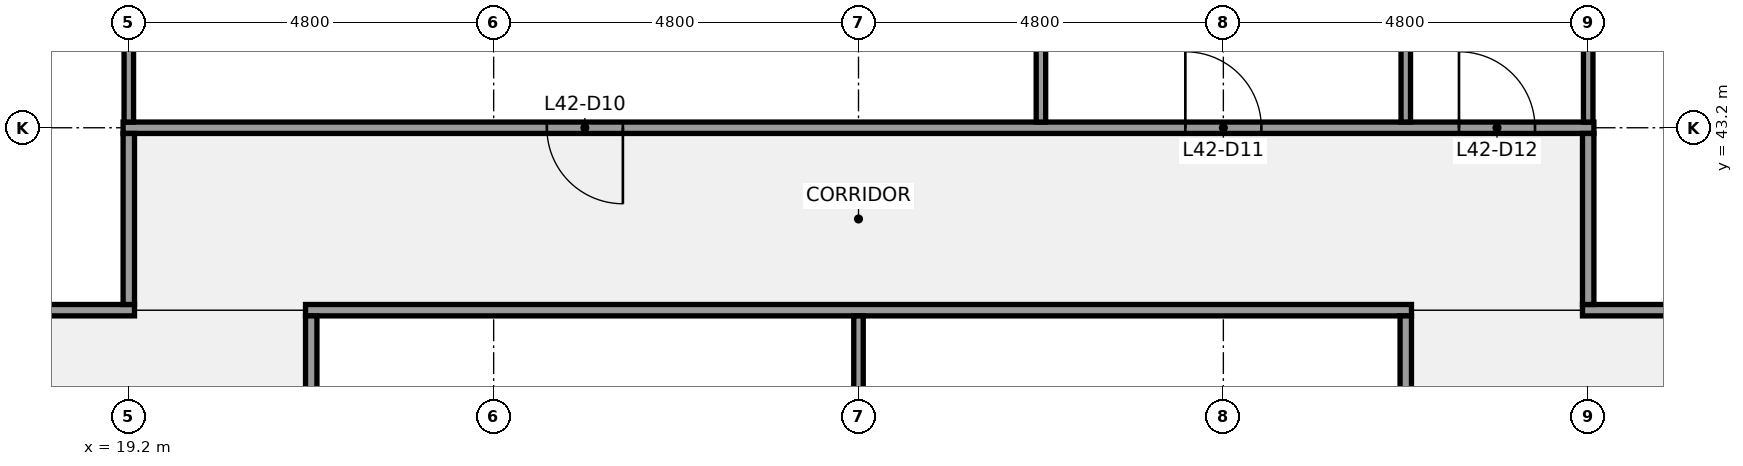
"""IFC4 building model, lengths in metres.
Left out: names, types, materials, properties, quantities, classifications, styles, units other than length and angle.
Written with IfcOpenShell. Run it as: python <this file> out.ifc"""

import sys

from ifc_helpers import new_model, si_unit, direction, frame, frame_2d, origin, place, context, subcontext, project, spatial, rectangle, extrude, element, fill, save


model = new_model("IFC4")
c1 = context("Model", 3, precision=1e-05, world=origin(), true_north=direction((0.0, 1.0)))
c2 = subcontext(c1, "Body", "Model", "MODEL_VIEW")
j1 = project(units=[si_unit("LENGTHUNIT", "METRE"), si_unit("PLANEANGLEUNIT", "RADIAN")], contexts=[c1])
p1 = place(None, origin())
s1 = spatial("IfcSite", under=j1, at=p1, CompositionType="ELEMENT")
p2 = place(p1, origin())
s2 = spatial("IfcBuilding", under=s1, at=p2, CompositionType="ELEMENT")
p3 = place(p2, frame((0.0, 0.0, 197.2)))
s3 = spatial("IfcBuildingStorey", under=s2, at=p3, CompositionType="ELEMENT", Elevation=197.2)
p4 = place(p3, frame((14.325, 40.8, 0.0), z_axis=(0.0, 0.0, 1.0), x_axis=(1.0, 0.0, 0.0)))
e1 = element("IfcWall", 1, at=p4, inside=s3, PredefinedType="PARTITIONING", context=c2, shape_type="SweptSolid", body=[
    extrude(rectangle(XDim=4.95, YDim=0.15, at=frame_2d((2.475, 0.0))), origin(), (0.0, 0.0, 1.0), 2.87),
])
p5 = place(p4, frame((1.975, 0.0, 0.0)))
e2 = element("IfcOpeningElement", 2, at=p5, cuts=e1, PredefinedType="OPENING", context=c2, shape_type="SweptSolid", body=[
    extrude(rectangle(XDim=1.0, YDim=2.1, at=frame_2d((0.5, 1.05))), frame((0.0, 0.085, 0.0), z_axis=(0.0, -1.0, 0.0), x_axis=(1.0, 0.0, 0.0)), (0.0, 0.0, 1.0), 0.17),
])
p6 = place(p3, frame((21.525, 40.8, 0.0), z_axis=(0.0, 0.0, 1.0), x_axis=(1.0, 0.0, 0.0)))
e3 = element("IfcWall", 3, at=p6, inside=s3, PredefinedType="PARTITIONING", context=c2, shape_type="SweptSolid", body=[
    extrude(rectangle(XDim=14.55, YDim=0.15, at=frame_2d((7.275, 0.0))), origin(), (0.0, 0.0, 1.0), 2.87),
])
p7 = place(p3, frame((38.325, 40.8, 0.0), z_axis=(0.0, 0.0, 1.0), x_axis=(1.0, 0.0, 0.0)))
e4 = element("IfcWall", 4, at=p7, inside=s3, PredefinedType="PARTITIONING", context=c2, shape_type="SweptSolid", body=[
    extrude(rectangle(XDim=4.95, YDim=0.15, at=frame_2d((2.475, 0.0))), origin(), (0.0, 0.0, 1.0), 2.87),
])
p8 = place(p7, frame((1.975, 0.0, 0.0)))
e5 = element("IfcOpeningElement", 5, at=p8, cuts=e4, PredefinedType="OPENING", context=c2, shape_type="SweptSolid", body=[
    extrude(rectangle(XDim=1.0, YDim=2.1, at=frame_2d((0.5, 1.05))), frame((0.0, 0.085, 0.0), z_axis=(0.0, -1.0, 0.0), x_axis=(1.0, 0.0, 0.0)), (0.0, 0.0, 1.0), 0.17),
])
p9 = place(p3, frame((19.125, 43.2, 0.0), z_axis=(0.0, 0.0, 1.0), x_axis=(1.0, 0.0, 0.0)))
e6 = element("IfcWall", 6, at=p9, inside=s3, PredefinedType="PARTITIONING", context=c2, shape_type="SweptSolid", body=[
    extrude(rectangle(XDim=19.35, YDim=0.15, at=frame_2d((9.675, 0.0))), origin(), (0.0, 0.0, 1.0), 2.87),
])
p10 = place(p9, frame((5.575, 0.0, 0.0)))
e7 = element("IfcOpeningElement", 7, at=p10, cuts=e6, PredefinedType="OPENING", context=c2, shape_type="SweptSolid", body=[
    extrude(rectangle(XDim=1.0, YDim=2.1, at=frame_2d((0.5, 1.05))), frame((0.0, 0.085, 0.0), z_axis=(0.0, -1.0, 0.0), x_axis=(1.0, 0.0, 0.0)), (0.0, 0.0, 1.0), 0.17),
])
p11 = place(p9, frame((13.975, 0.0, 0.0)))
e8 = element("IfcOpeningElement", 8, at=p11, cuts=e6, PredefinedType="OPENING", context=c2, shape_type="SweptSolid", body=[
    extrude(rectangle(XDim=1.0, YDim=2.1, at=frame_2d((0.5, 1.05))), frame((0.0, 0.085, 0.0), z_axis=(0.0, -1.0, 0.0), x_axis=(1.0, 0.0, 0.0)), (0.0, 0.0, 1.0), 0.17),
])
p12 = place(p9, frame((17.575, 0.0, 0.0)))
e9 = element("IfcOpeningElement", 9, at=p12, cuts=e6, PredefinedType="OPENING", context=c2, shape_type="SweptSolid", body=[
    extrude(rectangle(XDim=1.0, YDim=2.1, at=frame_2d((0.5, 1.05))), frame((0.0, 0.085, 0.0), z_axis=(0.0, -1.0, 0.0), x_axis=(1.0, 0.0, 0.0)), (0.0, 0.0, 1.0), 0.17),
])
p13 = place(p3, frame((19.2, 43.275, 0.0), z_axis=(0.0, 0.0, 1.0), x_axis=(0.0, 1.0, 0.0)))
e10 = element("IfcWall", 10, at=p13, inside=s3, PredefinedType="PARTITIONING", context=c2, shape_type="SweptSolid", body=[
    extrude(rectangle(XDim=4.175, YDim=0.125, at=frame_2d((2.087, 0.0))), origin(), (0.0, 0.0, 1.0), 2.87),
])
p14 = place(p3, frame((19.2, 40.875, 0.0), z_axis=(0.0, 0.0, 1.0), x_axis=(0.0, 1.0, 0.0)))
e11 = element("IfcWall", 11, at=p14, inside=s3, PredefinedType="PARTITIONING", context=c2, shape_type="SweptSolid", body=[
    extrude(rectangle(XDim=2.25, YDim=0.15, at=frame_2d((1.125, 0.0))), origin(), (0.0, 0.0, 1.0), 2.87),
])
p15 = place(p3, frame((21.6, 21.663, 0.0), z_axis=(0.0, 0.0, 1.0), x_axis=(0.0, 1.0, 0.0)))
e12 = element("IfcWall", 12, at=p15, inside=s3, PredefinedType="PARTITIONING", context=c2, shape_type="SweptSolid", body=[
    extrude(rectangle(XDim=19.062, YDim=0.15, at=frame_2d((9.531, 0.0))), origin(), (0.0, 0.0, 1.0), 2.87),
])
p16 = place(p15, frame((9.031, 0.0, 0.0)))
e13 = element("IfcOpeningElement", 13, at=p16, cuts=e12, PredefinedType="OPENING", context=c2, shape_type="SweptSolid", body=[
    extrude(rectangle(XDim=1.0, YDim=2.1, at=frame_2d((0.5, 1.05))), frame((0.0, 0.085, 0.0), z_axis=(0.0, -1.0, 0.0), x_axis=(1.0, 0.0, 0.0)), (0.0, 0.0, 1.0), 0.17),
])
p17 = place(p3, frame((28.8, 21.663, 0.0), z_axis=(0.0, 0.0, 1.0), x_axis=(0.0, 1.0, 0.0)))
e14 = element("IfcWall", 14, at=p17, inside=s3, PredefinedType="PARTITIONING", context=c2, shape_type="SweptSolid", body=[
    extrude(rectangle(XDim=19.062, YDim=0.125, at=frame_2d((9.531, 0.0))), origin(), (0.0, 0.0, 1.0), 2.87),
])
for number, where, z_axis, x_axis in (
    (15, (31.2, 43.275, 0.0), (0.0, 0.0, 1.0), (0.0, 1.0, 0.0)),
    (16, (36.0, 43.275, 0.0), (0.0, 0.0, 1.0), (0.0, 1.0, 0.0)),
):
    element("IfcWall", number, at=place(p3, frame(where, z_axis=z_axis, x_axis=x_axis)), inside=s3, PredefinedType="PARTITIONING", context=c2, shape_type="SweptSolid", body=[
        extrude(rectangle(XDim=4.625, YDim=0.125, at=frame_2d((2.312, 0.0))), origin(), (0.0, 0.0, 1.0), 2.87),
    ])
p18 = place(p3, frame((36.0, 21.663, 0.0), z_axis=(0.0, 0.0, 1.0), x_axis=(0.0, 1.0, 0.0)))
e17 = element("IfcWall", 17, at=p18, inside=s3, PredefinedType="PARTITIONING", context=c2, shape_type="SweptSolid", body=[
    extrude(rectangle(XDim=19.062, YDim=0.15, at=frame_2d((9.531, 0.0))), origin(), (0.0, 0.0, 1.0), 2.87),
])
p19 = place(p18, frame((9.031, 0.0, 0.0)))
e18 = element("IfcOpeningElement", 18, at=p19, cuts=e17, PredefinedType="OPENING", context=c2, shape_type="SweptSolid", body=[
    extrude(rectangle(XDim=1.0, YDim=2.1, at=frame_2d((0.5, 1.05))), frame((0.0, 0.085, 0.0), z_axis=(0.0, -1.0, 0.0), x_axis=(1.0, 0.0, 0.0)), (0.0, 0.0, 1.0), 0.17),
])
p20 = place(p3, frame((38.4, 43.275, 0.0), z_axis=(0.0, 0.0, 1.0), x_axis=(0.0, 1.0, 0.0)))
e19 = element("IfcWall", 19, at=p20, inside=s3, PredefinedType="PARTITIONING", context=c2, shape_type="SweptSolid", body=[
    extrude(rectangle(XDim=4.175, YDim=0.125, at=frame_2d((2.087, 0.0))), origin(), (0.0, 0.0, 1.0), 2.87),
])
p21 = place(p3, frame((38.4, 40.875, 0.0), z_axis=(0.0, 0.0, 1.0), x_axis=(0.0, 1.0, 0.0)))
e20 = element("IfcWall", 20, at=p21, inside=s3, PredefinedType="PARTITIONING", context=c2, shape_type="SweptSolid", body=[
    extrude(rectangle(XDim=2.25, YDim=0.15, at=frame_2d((1.125, 0.0))), origin(), (0.0, 0.0, 1.0), 2.87),
])
p22 = place(p10, origin())
e21 = element("IfcDoor", 21, at=p22, inside=s3, OperationType="SINGLE_SWING_RIGHT", PredefinedType="DOOR", context=c2, shape_type="SweptSolid", body=[
    extrude(rectangle(XDim=1.0, YDim=2.1, at=frame_2d((0.5, 1.05))), frame((0.0, 0.025, 0.0), z_axis=(0.0, -1.0, 0.0), x_axis=(1.0, 0.0, 0.0)), (0.0, 0.0, 1.0), 0.05),
])
fill(e7, e21)
p23 = place(p11, origin())
e22 = element("IfcDoor", 22, at=p23, inside=s3, OperationType="SINGLE_SWING_LEFT", PredefinedType="DOOR", context=c2, shape_type="SweptSolid", body=[
    extrude(rectangle(XDim=1.0, YDim=2.1, at=frame_2d((0.5, 1.05))), frame((0.0, 0.025, 0.0), z_axis=(0.0, -1.0, 0.0), x_axis=(1.0, 0.0, 0.0)), (0.0, 0.0, 1.0), 0.05),
])
fill(e8, e22)
p24 = place(p12, origin())
e23 = element("IfcDoor", 23, at=p24, inside=s3, OperationType="SINGLE_SWING_LEFT", PredefinedType="DOOR", context=c2, shape_type="SweptSolid", body=[
    extrude(rectangle(XDim=1.0, YDim=2.1, at=frame_2d((0.5, 1.05))), frame((0.0, 0.025, 0.0), z_axis=(0.0, -1.0, 0.0), x_axis=(1.0, 0.0, 0.0)), (0.0, 0.0, 1.0), 0.05),
])
fill(e9, e23)
save(model, sys.argv[1])
